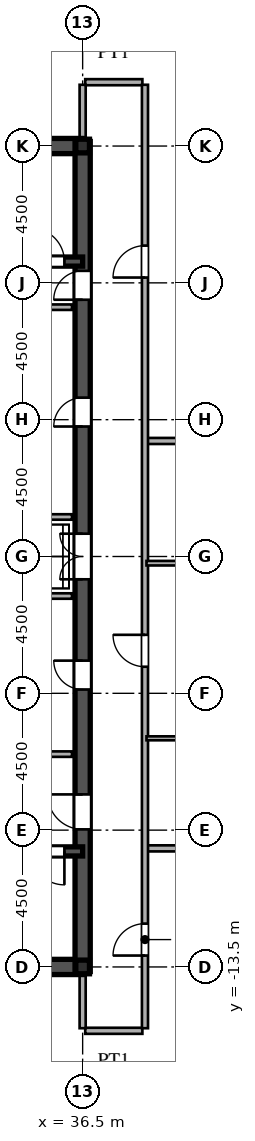
"""IFC4 building model, lengths in metres.
Left out: names, types, materials, properties, quantities, classifications, styles, units other than length and angle.
Written with IfcOpenShell. Run it as: python <this file> out.ifc"""

import sys

from ifc_helpers import new_model, si_unit, direction, frame, frame_2d, origin, origin_2d, place, context, subcontext, project, spatial, rectangle, i_section, extrude, source, transform, mapped, element, fill, save


model = new_model("IFC4")
c1 = context("Model", 3, precision=1e-05, world=origin(), true_north=direction((0.0, 1.0)))
c2 = subcontext(c1, "Body", "Model", "MODEL_VIEW")
j1 = project(units=[si_unit("LENGTHUNIT", "METRE"), si_unit("PLANEANGLEUNIT", "RADIAN")], contexts=[c1])
p1 = place(None, origin())
s1 = spatial("IfcSite", under=j1, at=p1, CompositionType="ELEMENT")
p2 = place(p1, origin())
s2 = spatial("IfcBuilding", under=s1, at=p2, CompositionType="ELEMENT")
p3 = place(p2, frame((0.0, 0.0, 265.65)))
s3 = spatial("IfcBuildingStorey", under=s2, at=p3, CompositionType="ELEMENT", Elevation=265.65)
m1 = source(origin(), c2, "Body", "SweptSolid", [
    extrude(i_section(OverallWidth=0.45, OverallDepth=0.45, WebThickness=0.016, FlangeThickness=0.025, at=origin_2d()), origin(), (0.0, 0.0, 1.0), 3.75),
])
for number, where, z_axis, x_axis in (
    (1, (36.5, -13.5, 0.0), (0.0, 0.0, 1.0), (1.0, 0.0, 0.0)),
    (2, (36.5, 13.5, 0.0), (0.0, 0.0, 1.0), (1.0, 0.0, 0.0)),
):
    element("IfcColumn", number, at=place(p3, frame(where, z_axis=z_axis, x_axis=x_axis)), inside=s3, PredefinedType="COLUMN", context=c2, shape_type="MappedRepresentation", body=[
        mapped(m1, transform((0.0, 0.0, 0.0), scale=1.0)),
    ])
for number, where, z_axis, x_axis in (
    (3, (27.5, -13.5, 0.0), (0.0, 0.0, 1.0), (1.0, 0.0, 0.0)),
    (4, (27.5, 13.5, 0.0), (0.0, 0.0, 1.0), (1.0, 0.0, 0.0)),
):
    element("IfcWall", number, at=place(p3, frame(where, z_axis=z_axis, x_axis=x_axis)), inside=s3, PredefinedType="SHEAR", context=c2, shape_type="SweptSolid", body=[
        extrude(rectangle(XDim=9.0, YDim=0.5, at=frame_2d((4.5, 0.0))), origin(), (0.0, 0.0, 1.0), 3.49),
    ])
p4 = place(p3, frame((36.5, -13.65, 0.0), z_axis=(0.0, 0.0, 1.0), x_axis=(0.0, 1.0, 0.0)))
e5 = element("IfcWall", 5, at=p4, inside=s3, PredefinedType="SHEAR", context=c2, shape_type="SweptSolid", body=[
    extrude(rectangle(XDim=7.15, YDim=0.5, at=frame_2d((3.575, 0.0))), origin(), (0.0, 0.0, 1.0), 3.49),
])
p5 = place(p4, frame((4.675, 0.0, 0.0)))
e6 = element("IfcOpeningElement", 6, at=p5, cuts=e5, PredefinedType="OPENING", context=c2, shape_type="SweptSolid", body=[
    extrude(rectangle(XDim=1.15, YDim=2.2, at=frame_2d((0.575, 1.1))), frame((0.0, 0.26, 0.0), z_axis=(0.0, -1.0, 0.0), x_axis=(1.0, 0.0, 0.0)), (0.0, 0.0, 1.0), 0.52),
])
p6 = place(p3, frame((36.5, -1.3, 0.0), z_axis=(0.0, 0.0, 1.0), x_axis=(0.0, 1.0, 0.0)))
e7 = element("IfcWall", 7, at=p6, inside=s3, PredefinedType="SHEAR", context=c2, shape_type="SweptSolid", body=[
    extrude(rectangle(XDim=2.6, YDim=0.5, at=frame_2d((1.3, 0.0))), origin(), (0.0, 0.0, 1.0), 3.49),
])
p7 = place(p6, frame((0.55, 0.0, 0.0)))
e8 = element("IfcOpeningElement", 8, at=p7, cuts=e7, PredefinedType="OPENING", context=c2, shape_type="SweptSolid", body=[
    extrude(rectangle(XDim=1.5, YDim=2.3, at=frame_2d((0.75, 1.15))), frame((0.0, 0.26, 0.0), z_axis=(0.0, -1.0, 0.0), x_axis=(1.0, 0.0, 0.0)), (0.0, 0.0, 1.0), 0.52),
])
p8 = place(p3, frame((36.5, 8.2, 0.0), z_axis=(0.0, 0.0, 1.0), x_axis=(0.0, 1.0, 0.0)))
e9 = element("IfcWall", 9, at=p8, inside=s3, PredefinedType="SHEAR", context=c2, shape_type="SweptSolid", body=[
    extrude(rectangle(XDim=5.45, YDim=0.5, at=frame_2d((2.725, 0.0))), origin(), (0.0, 0.0, 1.0), 3.49),
])
p9 = place(p8, frame((0.245, 0.0, 0.0)))
e10 = element("IfcOpeningElement", 10, at=p9, cuts=e9, PredefinedType="OPENING", context=c2, shape_type="SweptSolid", body=[
    extrude(rectangle(XDim=0.95, YDim=2.15, at=frame_2d((0.475, 1.075))), frame((0.0, 0.26, 0.0), z_axis=(0.0, -1.0, 0.0), x_axis=(1.0, 0.0, 0.0)), (0.0, 0.0, 1.0), 0.52),
])
p10 = place(p3, frame((36.5, -6.5, 0.0), z_axis=(0.0, 0.0, 1.0), x_axis=(0.0, 1.0, 0.0)))
e11 = element("IfcWall", 11, at=p10, inside=s3, PredefinedType="SHEAR", context=c2, shape_type="SweptSolid", body=[
    extrude(rectangle(XDim=5.2, YDim=0.5, at=frame_2d((2.6, 0.0))), origin(), (0.0, 0.0, 1.0), 3.49),
])
p11 = place(p10, frame((2.125, 0.0, 0.0)))
e12 = element("IfcOpeningElement", 12, at=p11, cuts=e11, PredefinedType="OPENING", context=c2, shape_type="SweptSolid", body=[
    extrude(rectangle(XDim=0.95, YDim=2.15, at=frame_2d((0.475, 1.075))), frame((0.0, 0.26, 0.0), z_axis=(0.0, -1.0, 0.0), x_axis=(1.0, 0.0, 0.0)), (0.0, 0.0, 1.0), 0.52),
])
p12 = place(p3, frame((36.5, 1.3, 0.0), z_axis=(0.0, 0.0, 1.0), x_axis=(0.0, 1.0, 0.0)))
e13 = element("IfcWall", 13, at=p12, inside=s3, PredefinedType="SHEAR", context=c2, shape_type="SweptSolid", body=[
    extrude(rectangle(XDim=6.9, YDim=0.5, at=frame_2d((3.45, 0.0))), origin(), (0.0, 0.0, 1.0), 3.49),
])
p13 = place(p12, frame((2.975, 0.0, 0.0)))
e14 = element("IfcOpeningElement", 14, at=p13, cuts=e13, PredefinedType="OPENING", context=c2, shape_type="SweptSolid", body=[
    extrude(rectangle(XDim=0.95, YDim=2.15, at=frame_2d((0.475, 1.075))), frame((0.0, 0.26, 0.0), z_axis=(0.0, -1.0, 0.0), x_axis=(1.0, 0.0, 0.0)), (0.0, 0.0, 1.0), 0.52),
])
p14 = place(p3, frame((27.5, -9.7, 0.0), z_axis=(0.0, 0.0, 1.0), x_axis=(1.0, 0.0, 0.0)))
e15 = element("IfcWall", 15, at=p14, inside=s3, PredefinedType="SHEAR", context=c2, shape_type="SweptSolid", body=[
    extrude(rectangle(XDim=9.0, YDim=0.3, at=frame_2d((4.5, 0.0))), origin(), (0.0, 0.0, 1.0), 3.49),
])
p15 = place(p14, frame((7.3, 0.0, 0.0)))
e16 = element("IfcOpeningElement", 16, at=p15, cuts=e15, PredefinedType="OPENING", context=c2, shape_type="SweptSolid", body=[
    extrude(rectangle(XDim=1.1, YDim=2.2, at=frame_2d((0.55, 1.1))), frame((0.0, 0.16, 0.0), z_axis=(0.0, -1.0, 0.0), x_axis=(1.0, 0.0, 0.0)), (0.0, 0.0, 1.0), 0.32),
])
p16 = place(p3, frame((27.5, 9.7, 0.0), z_axis=(0.0, 0.0, 1.0), x_axis=(1.0, 0.0, 0.0)))
e17 = element("IfcWall", 17, at=p16, inside=s3, PredefinedType="SHEAR", context=c2, shape_type="SweptSolid", body=[
    extrude(rectangle(XDim=9.0, YDim=0.3, at=frame_2d((4.5, 0.0))), origin(), (0.0, 0.0, 1.0), 3.49),
])
p17 = place(p16, frame((7.3, 0.0, 0.0)))
e18 = element("IfcOpeningElement", 18, at=p17, cuts=e17, PredefinedType="OPENING", context=c2, shape_type="SweptSolid", body=[
    extrude(rectangle(XDim=1.1, YDim=2.2, at=frame_2d((0.55, 1.1))), frame((0.0, 0.16, 0.0), z_axis=(0.0, -1.0, 0.0), x_axis=(1.0, 0.0, 0.0)), (0.0, 0.0, 1.0), 0.32),
])
for number, where, z_axis, x_axis in (
    (19, (30.45, -6.5, 0.0), (0.0, 0.0, 1.0), (1.0, 0.0, 0.0)),
    (20, (30.45, 8.2, 0.0), (0.0, 0.0, 1.0), (1.0, 0.0, 0.0)),
):
    element("IfcWall", number, at=place(p3, frame(where, z_axis=z_axis, x_axis=x_axis)), inside=s3, PredefinedType="PARTITIONING", context=c2, shape_type="SweptSolid", body=[
        extrude(rectangle(XDim=5.7, YDim=0.18, at=frame_2d((2.85, 0.0))), origin(), (0.0, 0.0, 1.0), 3.49),
    ])
for number, where, z_axis, x_axis in (
    (21, (33.2, -1.3, 0.0), (0.0, 0.0, 1.0), (1.0, 0.0, 0.0)),
    (22, (33.2, 1.3, 0.0), (0.0, 0.0, 1.0), (1.0, 0.0, 0.0)),
):
    element("IfcWall", number, at=place(p3, frame(where, z_axis=z_axis, x_axis=x_axis)), inside=s3, PredefinedType="PARTITIONING", context=c2, shape_type="SweptSolid", body=[
        extrude(rectangle(XDim=2.95, YDim=0.18, at=frame_2d((1.475, 0.0))), origin(), (0.0, 0.0, 1.0), 3.49),
    ])
p18 = place(p3, frame((36.585, -15.6, 0.0), z_axis=(0.0, 0.0, 1.0), x_axis=(1.0, 0.0, 0.0)))
e23 = element("IfcWall", 23, at=p18, inside=s3, PredefinedType="PARTITIONING", context=c2, shape_type="SweptSolid", body=[
    extrude(rectangle(XDim=1.88, YDim=0.2, at=frame_2d((0.94, 0.0))), origin(), (0.0, 0.0, 1.0), 3.49),
])
p19 = place(p3, frame((38.63, -9.6, 0.0), z_axis=(0.0, 0.0, 1.0), x_axis=(1.0, 0.0, 0.0)))
e24 = element("IfcWall", 24, at=p19, inside=s3, PredefinedType="PARTITIONING", context=c2, shape_type="SweptSolid", body=[
    extrude(rectangle(XDim=15.38, YDim=0.2, at=frame_2d((7.69, 0.0))), origin(), (0.0, 0.0, 1.0), 3.49),
])
p20 = place(p3, frame((38.6, -5.98, 0.0), z_axis=(0.0, 0.0, 1.0), x_axis=(1.0, 0.0, 0.0)))
e25 = element("IfcWall", 25, at=p20, inside=s3, PredefinedType="PARTITIONING", context=c2, shape_type="SweptSolid", body=[
    extrude(rectangle(XDim=4.8, YDim=0.13, at=frame_2d((2.4, 0.0))), origin(), (0.0, 0.0, 1.0), 3.49),
])
p21 = place(p20, frame((1.96, 0.0, 0.0)))
e26 = element("IfcOpeningElement", 26, at=p21, cuts=e25, PredefinedType="OPENING", context=c2, shape_type="SweptSolid", body=[
    extrude(rectangle(XDim=0.88, YDim=2.1, at=frame_2d((0.44, 1.05))), frame((0.0, 0.075, 0.0), z_axis=(0.0, -1.0, 0.0), x_axis=(1.0, 0.0, 0.0)), (0.0, 0.0, 1.0), 0.15),
])
p22 = place(p3, frame((38.6, -0.22, 0.0), z_axis=(0.0, 0.0, 1.0), x_axis=(1.0, 0.0, 0.0)))
e27 = element("IfcWall", 27, at=p22, inside=s3, PredefinedType="PARTITIONING", context=c2, shape_type="SweptSolid", body=[
    extrude(rectangle(XDim=4.8, YDim=0.15, at=frame_2d((2.4, 0.0))), origin(), (0.0, 0.0, 1.0), 3.49),
])
p23 = place(p22, frame((1.925, 0.0, 0.0)))
e28 = element("IfcOpeningElement", 28, at=p23, cuts=e27, PredefinedType="OPENING", context=c2, shape_type="SweptSolid", body=[
    extrude(rectangle(XDim=0.95, YDim=2.15, at=frame_2d((0.475, 1.075))), frame((0.0, 0.085, 0.0), z_axis=(0.0, -1.0, 0.0), x_axis=(1.0, 0.0, 0.0)), (0.0, 0.0, 1.0), 0.17),
])
p24 = place(p3, frame((38.63, 3.8, 0.0), z_axis=(0.0, 0.0, 1.0), x_axis=(1.0, 0.0, 0.0)))
e29 = element("IfcWall", 29, at=p24, inside=s3, PredefinedType="PARTITIONING", context=c2, shape_type="SweptSolid", body=[
    extrude(rectangle(XDim=25.046, YDim=0.2, at=frame_2d((12.523, 0.0))), origin(), (0.0, 0.0, 1.0), 3.49),
])
p25 = place(p3, frame((36.585, 15.6, 0.0), z_axis=(0.0, 0.0, 1.0), x_axis=(1.0, 0.0, 0.0)))
e30 = element("IfcWall", 30, at=p25, inside=s3, PredefinedType="PARTITIONING", context=c2, shape_type="SweptSolid", body=[
    extrude(rectangle(XDim=1.88, YDim=0.2, at=frame_2d((0.94, 0.0))), origin(), (0.0, 0.0, 1.0), 3.49),
])
for number, where, z_axis, x_axis in (
    (31, (36.5, -15.515, 0.0), (0.0, 0.0, 1.0), (0.0, 1.0, 0.0)),
    (32, (36.5, 13.755, 0.0), (0.0, 0.0, 1.0), (0.0, 1.0, 0.0)),
):
    element("IfcWall", number, at=place(p3, frame(where, z_axis=z_axis, x_axis=x_axis)), inside=s3, PredefinedType="PARTITIONING", context=c2, shape_type="SweptSolid", body=[
        extrude(rectangle(XDim=1.76, YDim=0.2, at=frame_2d((0.88, 0.0))), origin(), (0.0, 0.0, 1.0), 2.89),
    ])
p26 = place(p3, frame((38.55, -15.515, 0.0), z_axis=(0.0, 0.0, 1.0), x_axis=(0.0, 1.0, 0.0)))
e33 = element("IfcWall", 33, at=p26, inside=s3, PredefinedType="PARTITIONING", context=c2, shape_type="SweptSolid", body=[
    extrude(rectangle(XDim=31.03, YDim=0.2, at=frame_2d((15.515, 0.0))), origin(), (0.0, 0.0, 1.0), 3.49),
])
p27 = place(p26, frame((2.39, 0.0, 0.0)))
e34 = element("IfcOpeningElement", 34, at=p27, cuts=e33, PredefinedType="OPENING", context=c2, shape_type="SweptSolid", body=[
    extrude(rectangle(XDim=1.05, YDim=2.25, at=frame_2d((0.525, 1.125))), frame((0.0, 0.11, 0.0), z_axis=(0.0, -1.0, 0.0), x_axis=(1.0, 0.0, 0.0)), (0.0, 0.0, 1.0), 0.22),
])
p28 = place(p26, frame((11.889, 0.0, 0.0)))
e35 = element("IfcOpeningElement", 35, at=p28, cuts=e33, PredefinedType="OPENING", context=c2, shape_type="SweptSolid", body=[
    extrude(rectangle(XDim=1.05, YDim=2.25, at=frame_2d((0.525, 1.125))), frame((0.0, 0.11, 0.0), z_axis=(0.0, -1.0, 0.0), x_axis=(1.0, 0.0, 0.0)), (0.0, 0.0, 1.0), 0.22),
])
p29 = place(p26, frame((24.69, 0.0, 0.0)))
e36 = element("IfcOpeningElement", 36, at=p29, cuts=e33, PredefinedType="OPENING", context=c2, shape_type="SweptSolid", body=[
    extrude(rectangle(XDim=1.05, YDim=2.25, at=frame_2d((0.525, 1.125))), frame((0.0, 0.11, 0.0), z_axis=(0.0, -1.0, 0.0), x_axis=(1.0, 0.0, 0.0)), (0.0, 0.0, 1.0), 0.22),
])
m2 = source(origin(), c2, "Body", "SweptSolid", [
    extrude(rectangle(XDim=1.15, YDim=2.2, at=frame_2d((0.575, 1.1))), frame((0.0, 0.025, 0.0), z_axis=(0.0, -1.0, 0.0), x_axis=(1.0, 0.0, 0.0)), (0.0, 0.0, 1.0), 0.05),
])
p30 = place(p5, origin())
e37 = element("IfcDoor", 37, at=p30, inside=s3, OperationType="SINGLE_SWING_RIGHT", PredefinedType="DOOR", context=c2, shape_type="MappedRepresentation", body=[
    mapped(m2, transform((0.0, 0.0, 0.0), scale=1.0)),
])
fill(e6, e37)
m3 = source(origin(), c2, "Body", "SweptSolid", [
    extrude(rectangle(XDim=1.5, YDim=2.3, at=frame_2d((0.75, 1.15))), frame((0.0, 0.025, 0.0), z_axis=(0.0, -1.0, 0.0), x_axis=(1.0, 0.0, 0.0)), (0.0, 0.0, 1.0), 0.05),
])
p31 = place(p7, origin())
e38 = element("IfcDoor", 38, at=p31, inside=s3, OperationType="DOUBLE_SWING_LEFT", PredefinedType="DOOR", context=c2, shape_type="MappedRepresentation", body=[
    mapped(m3, transform((0.0, 0.0, 0.0), scale=1.0)),
])
fill(e8, e38)
m4 = source(origin(), c2, "Body", "SweptSolid", [
    extrude(rectangle(XDim=0.95, YDim=2.15, at=frame_2d((0.475, 1.075))), frame((0.0, 0.025, 0.0), z_axis=(0.0, -1.0, 0.0), x_axis=(1.0, 0.0, 0.0)), (0.0, 0.0, 1.0), 0.05),
])
p32 = place(p9, origin())
e39 = element("IfcDoor", 39, at=p32, inside=s3, OperationType="SINGLE_SWING_LEFT", PredefinedType="DOOR", context=c2, shape_type="MappedRepresentation", body=[
    mapped(m4, transform((0.0, 0.0, 0.0), scale=1.0)),
])
fill(e10, e39)
p33 = place(p11, origin())
e40 = element("IfcDoor", 40, at=p33, inside=s3, OperationType="SINGLE_SWING_RIGHT", PredefinedType="DOOR", context=c2, shape_type="MappedRepresentation", body=[
    mapped(m4, transform((0.0, 0.0, 0.0), scale=1.0)),
])
fill(e12, e40)
p34 = place(p13, origin())
e41 = element("IfcDoor", 41, at=p34, inside=s3, OperationType="SINGLE_SWING_LEFT", PredefinedType="DOOR", context=c2, shape_type="MappedRepresentation", body=[
    mapped(m4, transform((0.0, 0.0, 0.0), scale=1.0)),
])
fill(e14, e41)
m5 = source(origin(), c2, "Body", "SweptSolid", [
    extrude(rectangle(XDim=1.1, YDim=2.2, at=frame_2d((0.55, 1.1))), frame((0.0, 0.025, 0.0), z_axis=(0.0, -1.0, 0.0), x_axis=(1.0, 0.0, 0.0)), (0.0, 0.0, 1.0), 0.05),
])
p35 = place(p15, frame((1.1, 0.0, 0.0), z_axis=(0.0, 0.0, 1.0), x_axis=(-1.0, 0.0, 0.0)))
e42 = element("IfcDoor", 42, at=p35, inside=s3, OperationType="SINGLE_SWING_RIGHT", PredefinedType="DOOR", context=c2, shape_type="MappedRepresentation", body=[
    mapped(m5, transform((0.0, 0.0, 0.0), scale=1.0)),
])
fill(e16, e42)
p36 = place(p17, origin())
e43 = element("IfcDoor", 43, at=p36, inside=s3, OperationType="SINGLE_SWING_LEFT", PredefinedType="DOOR", context=c2, shape_type="MappedRepresentation", body=[
    mapped(m5, transform((0.0, 0.0, 0.0), scale=1.0)),
])
fill(e18, e43)
m6 = source(origin(), c2, "Body", "SweptSolid", [
    extrude(rectangle(XDim=1.05, YDim=2.25, at=frame_2d((0.525, 1.125))), frame((0.0, 0.025, 0.0), z_axis=(0.0, -1.0, 0.0), x_axis=(1.0, 0.0, 0.0)), (0.0, 0.0, 1.0), 0.05),
])
p37 = place(p27, origin())
e44 = element("IfcDoor", 44, at=p37, inside=s3, OperationType="SINGLE_SWING_LEFT", PredefinedType="DOOR", context=c2, shape_type="MappedRepresentation", body=[
    mapped(m6, transform((0.0, 0.0, 0.0), scale=1.0)),
])
fill(e34, e44)
p38 = place(p28, origin())
e45 = element("IfcDoor", 45, at=p38, inside=s3, OperationType="SINGLE_SWING_RIGHT", PredefinedType="DOOR", context=c2, shape_type="MappedRepresentation", body=[
    mapped(m6, transform((0.0, 0.0, 0.0), scale=1.0)),
])
fill(e35, e45)
p39 = place(p29, origin())
e46 = element("IfcDoor", 46, at=p39, inside=s3, OperationType="SINGLE_SWING_LEFT", PredefinedType="DOOR", context=c2, shape_type="MappedRepresentation", body=[
    mapped(m6, transform((0.0, 0.0, 0.0), scale=1.0)),
])
fill(e36, e46)
save(model, sys.argv[1])
